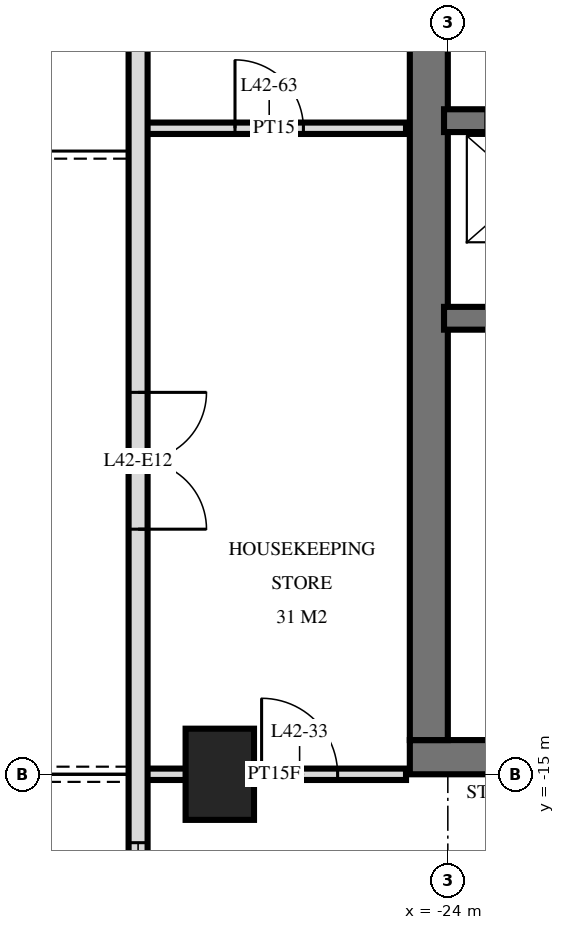
"""IFC4 building model, lengths in metres.
Left out: names, types, materials, properties, quantities, classifications, styles, units other than length and angle.
Written with IfcOpenShell. Run it as: python <this file> out.ifc"""

import sys

from ifc_helpers import new_model, si_unit, direction, frame, frame_2d, origin, origin_2d, place, context, subcontext, project, spatial, rectangle, extrude, element, fill, save


model = new_model("IFC4")
c1 = context("Model", 3, precision=1e-05, world=origin(), true_north=direction((0.0, 1.0)))
c2 = subcontext(c1, "Body", "Model", "MODEL_VIEW")
j1 = project(units=[si_unit("LENGTHUNIT", "METRE"), si_unit("PLANEANGLEUNIT", "RADIAN")], contexts=[c1])
p1 = place(None, origin())
s1 = spatial("IfcSite", under=j1, at=p1, CompositionType="ELEMENT")
p2 = place(p1, origin())
s2 = spatial("IfcBuilding", under=s1, at=p2, CompositionType="ELEMENT")
p3 = place(p2, frame((0.0, 0.0, 163.2)))
s3 = spatial("IfcBuildingStorey", under=s2, at=p3, CompositionType="ELEMENT", Elevation=163.2)
p4 = place(p3, frame((-27.0, -15.0, 0.0), z_axis=(0.0, 0.0, 1.0), x_axis=(0.0, 1.0, 0.0)))
e1 = element("IfcColumn", 1, at=p4, inside=s3, PredefinedType="COLUMN", context=c2, shape_type="SweptSolid", body=[
    extrude(rectangle(XDim=1.2, YDim=0.9, at=origin_2d()), origin(), (0.0, 0.0, 1.0), 3.6),
])
p5 = place(p3, frame((-24.5, -14.775, 0.0), z_axis=(0.0, 0.0, 1.0), x_axis=(1.0, 0.0, 0.0)))
e2 = element("IfcWall", 2, at=p5, inside=s3, PredefinedType="SHEAR", context=c2, shape_type="SweptSolid", body=[
    extrude(rectangle(XDim=14.5, YDim=0.45, at=frame_2d((7.25, 0.0))), origin(), (0.0, 0.0, 1.0), 3.6),
])
p6 = place(p5, frame((6.2, 0.0, 0.0)))
e3 = element("IfcOpeningElement", 3, at=p6, cuts=e2, PredefinedType="OPENING", context=c2, shape_type="SweptSolid", body=[
    extrude(rectangle(XDim=1.2, YDim=2.1, at=frame_2d((0.6, 1.05))), frame((0.0, 0.235, 0.0), z_axis=(0.0, -1.0, 0.0), x_axis=(1.0, 0.0, 0.0)), (0.0, 0.0, 1.0), 0.47),
])
p7 = place(p5, frame((9.25, 0.0, 0.0)))
e4 = element("IfcOpeningElement", 4, at=p7, cuts=e2, PredefinedType="OPENING", context=c2, shape_type="SweptSolid", body=[
    extrude(rectangle(XDim=1.1, YDim=2.1, at=frame_2d((0.55, 1.05))), frame((0.0, 0.235, 0.0), z_axis=(0.0, -1.0, 0.0), x_axis=(1.0, 0.0, 0.0)), (0.0, 0.0, 1.0), 0.47),
])
p8 = place(p5, frame((3.5, 0.0, 0.0)))
e5 = element("IfcOpeningElement", 5, at=p8, cuts=e2, PredefinedType="OPENING", context=c2, shape_type="SweptSolid", body=[
    extrude(rectangle(XDim=0.9, YDim=2.1, at=frame_2d((0.45, 1.05))), frame((0.0, 0.235, 0.0), z_axis=(0.0, -1.0, 0.0), x_axis=(1.0, 0.0, 0.0)), (0.0, 0.0, 1.0), 0.47),
])
p9 = place(p5, frame((1.05, 0.0, 0.0)))
e6 = element("IfcOpeningElement", 6, at=p9, cuts=e2, PredefinedType="OPENING", context=c2, shape_type="SweptSolid", body=[
    extrude(rectangle(XDim=1.0, YDim=2.1, at=frame_2d((0.5, 1.05))), frame((0.0, 0.235, 0.0), z_axis=(0.0, -1.0, 0.0), x_axis=(1.0, 0.0, 0.0)), (0.0, 0.0, 1.0), 0.47),
])
p10 = place(p3, frame((-24.25, -14.55, 0.0), z_axis=(0.0, 0.0, 1.0), x_axis=(0.0, 1.0, 0.0)))
e7 = element("IfcWall", 7, at=p10, inside=s3, PredefinedType="SHEAR", context=c2, shape_type="SweptSolid", body=[
    extrude(rectangle(XDim=14.1, YDim=0.5, at=frame_2d((7.05, 0.0))), origin(), (0.0, 0.0, 1.0), 3.6),
])
p11 = place(p3, frame((-24.05, -6.4, 0.0), z_axis=(0.0, 0.0, 1.0), x_axis=(1.0, 0.0, 0.0)))
e8 = element("IfcWall", 8, at=p11, inside=s3, PredefinedType="SHEAR", context=c2, shape_type="SweptSolid", body=[
    extrude(rectangle(XDim=13.7, YDim=0.3, at=frame_2d((6.85, 0.0))), origin(), (0.0, 0.0, 1.0), 3.6),
])
p12 = place(p11, frame((0.55, 0.0, 0.0)))
e9 = element("IfcOpeningElement", 9, at=p12, cuts=e8, PredefinedType="OPENING", context=c2, shape_type="SweptSolid", body=[
    extrude(rectangle(XDim=1.1, YDim=2.1, at=frame_2d((0.55, 1.05))), frame((0.0, 0.16, 0.0), z_axis=(0.0, -1.0, 0.0), x_axis=(1.0, 0.0, 0.0)), (0.0, 0.0, 1.0), 0.32),
])
p13 = place(p11, frame((5.8, 0.0, 0.0)))
e10 = element("IfcOpeningElement", 10, at=p13, cuts=e8, PredefinedType="OPENING", context=c2, shape_type="SweptSolid", body=[
    extrude(rectangle(XDim=1.1, YDim=2.1, at=frame_2d((0.55, 1.05))), frame((0.0, 0.16, 0.0), z_axis=(0.0, -1.0, 0.0), x_axis=(1.0, 0.0, 0.0)), (0.0, 0.0, 1.0), 0.32),
])
p14 = place(p3, frame((-24.05, -9.0, 0.0), z_axis=(0.0, 0.0, 1.0), x_axis=(1.0, 0.0, 0.0)))
e11 = element("IfcWall", 11, at=p14, inside=s3, PredefinedType="SHEAR", context=c2, shape_type="SweptSolid", body=[
    extrude(rectangle(XDim=13.7, YDim=0.3, at=frame_2d((6.85, 0.0))), origin(), (0.0, 0.0, 1.0), 3.6),
])
p15 = place(p14, frame((8.8, 0.0, 0.0)))
e12 = element("IfcOpeningElement", 12, at=p15, cuts=e11, PredefinedType="OPENING", context=c2, shape_type="SweptSolid", body=[
    extrude(rectangle(XDim=1.1, YDim=2.1, at=frame_2d((0.55, 1.05))), frame((0.0, 0.16, 0.0), z_axis=(0.0, -1.0, 0.0), x_axis=(1.0, 0.0, 0.0)), (0.0, 0.0, 1.0), 0.32),
])
p16 = place(p3, frame((-28.075, -3.325, 0.0), z_axis=(0.0, 0.0, 1.0), x_axis=(0.0, -1.0, 0.0)))
e13 = element("IfcWall", 13, at=p16, inside=s3, PredefinedType="SOLIDWALL", context=c2, shape_type="SweptSolid", body=[
    extrude(rectangle(XDim=25.951, YDim=0.25, at=frame_2d((12.975, 0.0))), origin(), (0.0, 0.0, 1.0), 3.32),
])
p17 = place(p16, frame((6.65, 0.0, 0.0)))
e14 = element("IfcOpeningElement", 14, at=p17, cuts=e13, PredefinedType="OPENING", context=c2, shape_type="SweptSolid", body=[
    extrude(rectangle(XDim=1.8, YDim=2.4, at=frame_2d((0.9, 1.2))), frame((0.0, 0.135, 0.0), z_axis=(0.0, -1.0, 0.0), x_axis=(1.0, 0.0, 0.0)), (0.0, 0.0, 1.0), 0.27),
])
p18 = place(p16, frame((12.575, 0.0, 0.3)))
e15 = element("IfcOpeningElement", 15, at=p18, cuts=e13, PredefinedType="OPENING", context=c2, shape_type="SweptSolid", body=[
    extrude(rectangle(XDim=1.2, YDim=2.1, at=frame_2d((0.6, 1.05))), frame((0.0, 0.135, 0.0), z_axis=(0.0, -1.0, 0.0), x_axis=(1.0, 0.0, 0.0)), (0.0, 0.0, 1.0), 0.27),
])
p19 = place(p16, frame((18.175, 0.0, 0.0)))
e16 = element("IfcOpeningElement", 16, at=p19, cuts=e13, PredefinedType="OPENING", context=c2, shape_type="SweptSolid", body=[
    extrude(rectangle(XDim=1.8, YDim=2.4, at=frame_2d((0.9, 1.2))), frame((0.0, 0.135, 0.0), z_axis=(0.0, -1.0, 0.0), x_axis=(1.0, 0.0, 0.0)), (0.0, 0.0, 1.0), 0.27),
])
p20 = place(p16, frame((21.075, 0.0, 0.0)))
e17 = element("IfcOpeningElement", 17, at=p20, cuts=e13, PredefinedType="OPENING", context=c2, shape_type="SweptSolid", body=[
    extrude(rectangle(XDim=1.8, YDim=2.4, at=frame_2d((0.9, 1.2))), frame((0.0, 0.135, 0.0), z_axis=(0.0, -1.0, 0.0), x_axis=(1.0, 0.0, 0.0)), (0.0, 0.0, 1.0), 0.27),
])
p21 = place(p16, frame((23.825, 0.0, 0.3)))
e18 = element("IfcOpeningElement", 18, at=p21, cuts=e13, PredefinedType="OPENING", context=c2, shape_type="SweptSolid", body=[
    extrude(rectangle(XDim=1.8, YDim=2.1, at=frame_2d((0.9, 1.05))), frame((0.0, 0.135, 0.0), z_axis=(0.0, -1.0, 0.0), x_axis=(1.0, 0.0, 0.0)), (0.0, 0.0, 1.0), 0.27),
])
p22 = place(p3, frame((-28.02, -15.0, 0.0), z_axis=(0.0, 0.0, 1.0), x_axis=(1.0, 0.0, 0.0)))
e19 = element("IfcWall", 19, at=p22, inside=s3, PredefinedType="PARTITIONING", context=c2, shape_type="SweptSolid", body=[
    extrude(rectangle(XDim=3.47, YDim=0.15, at=frame_2d((1.735, 0.0))), origin(), (0.0, 0.0, 1.0), 3.32),
])
p23 = place(p22, frame((1.57, 0.0, 0.0)))
e20 = element("IfcOpeningElement", 20, at=p23, cuts=e19, PredefinedType="OPENING", context=c2, shape_type="SweptSolid", body=[
    extrude(rectangle(XDim=1.0, YDim=2.1, at=frame_2d((0.5, 1.05))), frame((0.0, 0.085, 0.0), z_axis=(0.0, -1.0, 0.0), x_axis=(1.0, 0.0, 0.0)), (0.0, 0.0, 1.0), 0.17),
])
p24 = place(p3, frame((-28.02, -6.5, 0.0), z_axis=(0.0, 0.0, 1.0), x_axis=(1.0, 0.0, 0.0)))
e21 = element("IfcWall", 21, at=p24, inside=s3, PredefinedType="PARTITIONING", context=c2, shape_type="SweptSolid", body=[
    extrude(rectangle(XDim=3.47, YDim=0.15, at=frame_2d((1.735, 0.0))), origin(), (0.0, 0.0, 1.0), 3.32),
])
p25 = place(p24, frame((1.22, 0.0, 0.0)))
e22 = element("IfcOpeningElement", 22, at=p25, cuts=e21, PredefinedType="OPENING", context=c2, shape_type="SweptSolid", body=[
    extrude(rectangle(XDim=0.9, YDim=2.1, at=frame_2d((0.45, 1.05))), frame((0.0, 0.085, 0.0), z_axis=(0.0, -1.0, 0.0), x_axis=(1.0, 0.0, 0.0)), (0.0, 0.0, 1.0), 0.17),
])
p26 = place(p17, origin())
e23 = element("IfcDoor", 23, at=p26, inside=s3, OperationType="DOUBLE_DOOR_SINGLE_SWING", PredefinedType="DOOR", context=c2, shape_type="SweptSolid", body=[
    extrude(rectangle(XDim=1.8, YDim=2.4, at=frame_2d((0.9, 1.2))), frame((0.0, 0.025, 0.0), z_axis=(0.0, -1.0, 0.0), x_axis=(1.0, 0.0, 0.0)), (0.0, 0.0, 1.0), 0.05),
])
fill(e14, e23)
p27 = place(p18, origin())
e24 = element("IfcWindow", 24, at=p27, inside=s3, PartitioningType="SINGLE_PANEL", PredefinedType="WINDOW", context=c2, shape_type="SweptSolid", body=[
    extrude(rectangle(XDim=1.2, YDim=2.1, at=frame_2d((0.6, 1.05))), frame((0.0, 0.03, 0.0), z_axis=(0.0, -1.0, 0.0), x_axis=(1.0, 0.0, 0.0)), (0.0, 0.0, 1.0), 0.06),
])
fill(e15, e24)
p28 = place(p23, origin())
e25 = element("IfcDoor", 25, at=p28, inside=s3, OperationType="SINGLE_SWING_RIGHT", PredefinedType="DOOR", context=c2, shape_type="SweptSolid", body=[
    extrude(rectangle(XDim=1.0, YDim=2.1, at=frame_2d((0.5, 1.05))), frame((0.0, 0.025, 0.0), z_axis=(0.0, -1.0, 0.0), x_axis=(1.0, 0.0, 0.0)), (0.0, 0.0, 1.0), 0.05),
])
fill(e20, e25)
p29 = place(p25, origin())
e26 = element("IfcDoor", 26, at=p29, inside=s3, OperationType="SINGLE_SWING_RIGHT", PredefinedType="DOOR", context=c2, shape_type="SweptSolid", body=[
    extrude(rectangle(XDim=0.9, YDim=2.1, at=frame_2d((0.45, 1.05))), frame((0.0, 0.025, 0.0), z_axis=(0.0, -1.0, 0.0), x_axis=(1.0, 0.0, 0.0)), (0.0, 0.0, 1.0), 0.05),
])
fill(e22, e26)
save(model, sys.argv[1])
